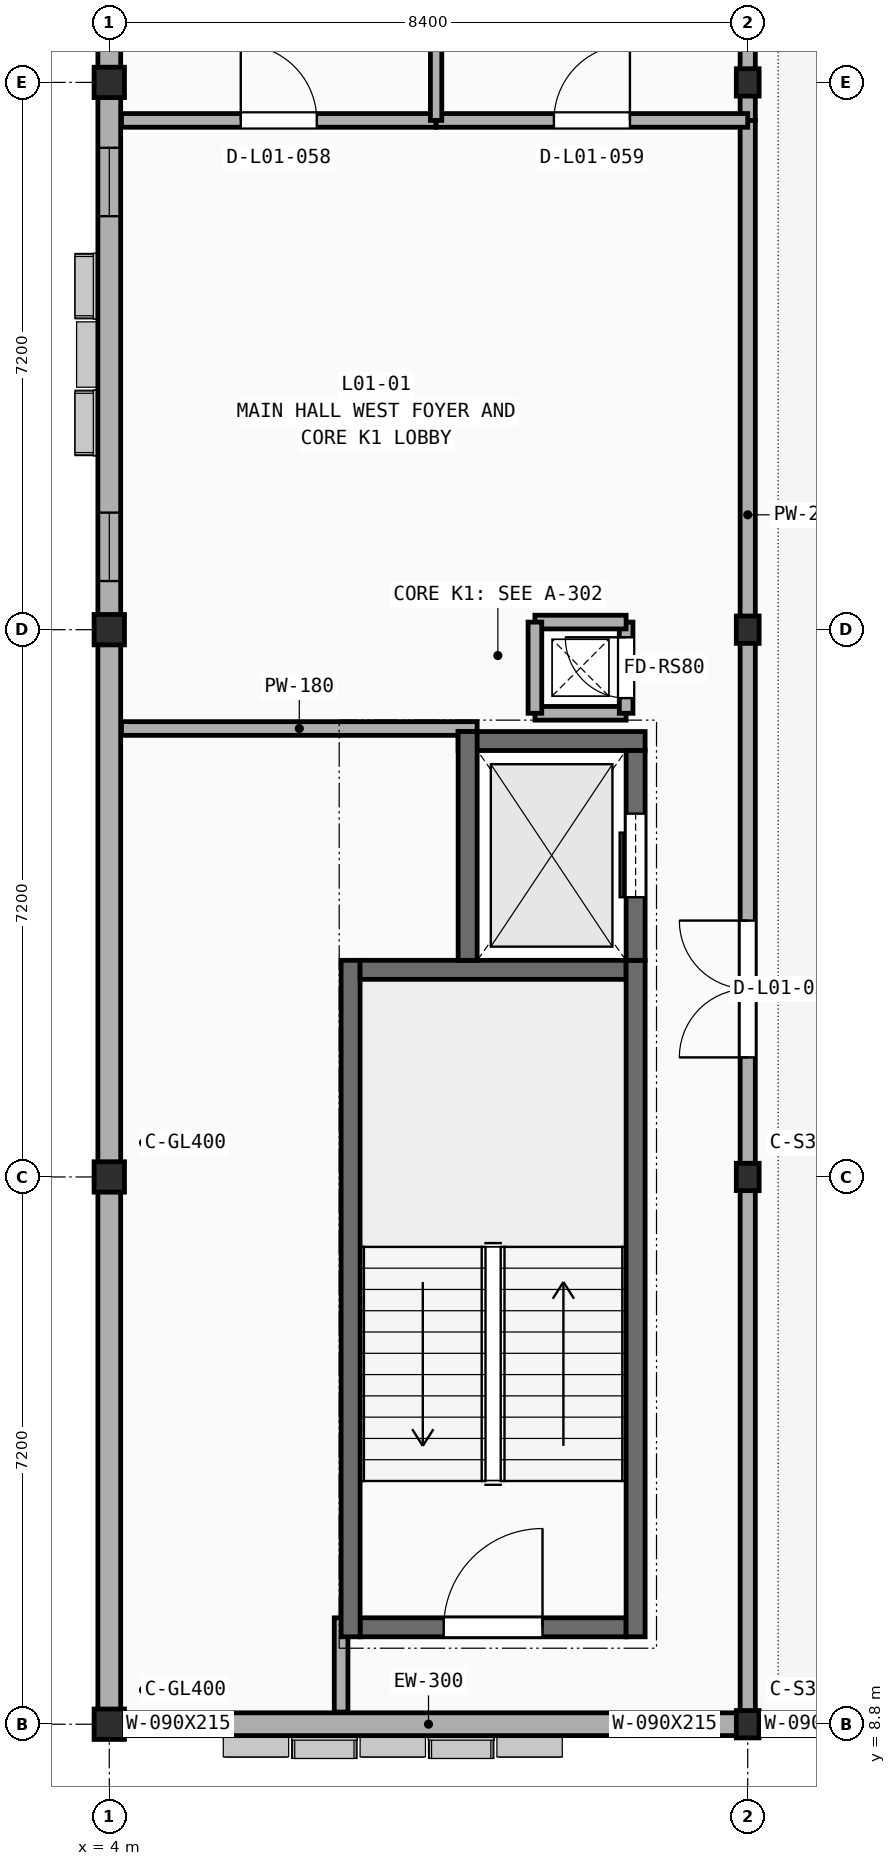
"""IFC4 building model, lengths in metres.
Left out: names, types, materials, properties, quantities, classifications, styles, units other than length and angle.
Written with IfcOpenShell. Run it as: python <this file> out.ifc"""

import sys

from ifc_helpers import new_model, si_unit, direction, frame, frame_2d, origin, origin_2d, place, context, subcontext, project, spatial, rectangle, i_section, extrude, element, fill, save


model = new_model("IFC4")
c1 = context("Model", 3, precision=1e-05, world=origin(), true_north=direction((0.0, 1.0)))
c2 = subcontext(c1, "Body", "Model", "MODEL_VIEW")
j1 = project(units=[si_unit("LENGTHUNIT", "METRE"), si_unit("PLANEANGLEUNIT", "RADIAN")], contexts=[c1])
p1 = place(None, origin())
s1 = spatial("IfcSite", under=j1, at=p1, CompositionType="ELEMENT")
p2 = place(p1, origin())
s2 = spatial("IfcBuilding", under=s1, at=p2, CompositionType="ELEMENT")
p3 = place(p2, frame((0.0, 0.0, 5.4)))
s3 = spatial("IfcBuildingStorey", under=s2, at=p3, CompositionType="ELEMENT", Elevation=5.4)
for number, where, z_axis, x_axis in (
    (1, (4.0, 8.8, 0.0), (0.0, 0.0, 1.0), (1.0, 0.0, 0.0)),
    (2, (4.0, 16.0, 0.0), (0.0, 0.0, 1.0), (1.0, 0.0, 0.0)),
    (3, (4.0, 23.2, 0.0), (0.0, 0.0, 1.0), (1.0, 0.0, 0.0)),
    (4, (4.0, 30.4, 0.0), (0.0, 0.0, 1.0), (1.0, 0.0, 0.0)),
):
    element("IfcColumn", number, at=place(p3, frame(where, z_axis=z_axis, x_axis=x_axis)), inside=s3, PredefinedType="COLUMN", context=c2, shape_type="SweptSolid", body=[
        extrude(rectangle(XDim=0.4, YDim=0.4, at=origin_2d()), origin(), (0.0, 0.0, 1.0), 4.2),
    ])
for number, where, z_axis, x_axis in (
    (5, (12.4, 8.8, 0.0), (0.0, 0.0, 1.0), (1.0, 0.0, 0.0)),
    (6, (12.4, 16.0, 0.0), (0.0, 0.0, 1.0), (1.0, 0.0, 0.0)),
    (7, (12.4, 23.2, 0.0), (0.0, 0.0, 1.0), (1.0, 0.0, 0.0)),
    (8, (12.4, 30.4, 0.0), (0.0, 0.0, 1.0), (1.0, 0.0, 0.0)),
):
    element("IfcColumn", number, at=place(p3, frame(where, z_axis=z_axis, x_axis=x_axis)), inside=s3, PredefinedType="COLUMN", context=c2, shape_type="SweptSolid", body=[
        extrude(i_section(OverallWidth=0.3, OverallDepth=0.36, WebThickness=0.012, FlangeThickness=0.022, at=origin_2d()), origin(), (0.0, 0.0, 1.0), 4.2),
    ])
p4 = place(p3, frame((7.05, 8.96, 0.0), z_axis=(0.0, 0.0, 1.0), x_axis=(0.0, 1.0, 0.0)))
e9 = element("IfcWall", 9, at=p4, inside=s3, PredefinedType="PARTITIONING", context=c2, shape_type="SweptSolid", body=[
    extrude(rectangle(XDim=1.24, YDim=0.18, at=frame_2d((0.62, 0.0))), origin(), (0.0, 0.0, 1.0), 3.5),
])
p5 = place(p3, frame((4.16, 21.9, 0.0), z_axis=(0.0, 0.0, 1.0), x_axis=(1.0, 0.0, 0.0)))
e10 = element("IfcWall", 10, at=p5, inside=s3, PredefinedType="PARTITIONING", context=c2, shape_type="SweptSolid", body=[
    extrude(rectangle(XDim=4.68, YDim=0.18, at=frame_2d((2.34, 0.0))), origin(), (0.0, 0.0, 1.0), 3.5),
])
p6 = place(p3, frame((12.4, 8.96, 0.0), z_axis=(0.0, 0.0, 1.0), x_axis=(0.0, 1.0, 0.0)))
e11 = element("IfcWall", 11, at=p6, inside=s3, PredefinedType="PARTITIONING", context=c2, shape_type="SweptSolid", body=[
    extrude(rectangle(XDim=20.94, YDim=0.2, at=frame_2d((10.47, 0.0))), origin(), (0.0, 0.0, 1.0), 3.35),
])
p7 = place(p6, frame((8.613, 0.0, -0.01)))
e12 = element("IfcOpeningElement", 12, at=p7, cuts=e11, PredefinedType="OPENING", context=c2, shape_type="SweptSolid", body=[
    extrude(rectangle(XDim=1.8, YDim=2.26, at=frame_2d((0.9, 1.13))), frame((0.0, 0.11, 0.0), z_axis=(0.0, -1.0, 0.0), x_axis=(1.0, 0.0, 0.0)), (0.0, 0.0, 1.0), 0.22),
])
p8 = place(p3, frame((12.4, 29.9, 0.0), z_axis=(0.0, 0.0, 1.0), x_axis=(0.0, 1.0, 0.0)))
e13 = element("IfcWall", 13, at=p8, inside=s3, PredefinedType="PARTITIONING", context=c2, shape_type="SweptSolid", body=[
    extrude(rectangle(XDim=7.56, YDim=0.2, at=frame_2d((3.78, 0.0))), origin(), (0.0, 0.0, 1.0), 3.23),
])
p9 = place(p3, frame((4.16, 29.9, 0.0), z_axis=(0.0, 0.0, 1.0), x_axis=(1.0, 0.0, 0.0)))
e14 = element("IfcWall", 14, at=p9, inside=s3, PredefinedType="PARTITIONING", context=c2, shape_type="SweptSolid", body=[
    extrude(rectangle(XDim=4.14, YDim=0.18, at=frame_2d((2.07, 0.0))), origin(), (0.0, 0.0, 1.0), 3.5),
])
p10 = place(p9, frame((1.57, 0.0, -0.01)))
e15 = element("IfcOpeningElement", 15, at=p10, cuts=e14, PredefinedType="OPENING", context=c2, shape_type="SweptSolid", body=[
    extrude(rectangle(XDim=1.0, YDim=2.16, at=frame_2d((0.5, 1.08))), frame((0.0, 0.1, 0.0), z_axis=(0.0, -1.0, 0.0), x_axis=(1.0, 0.0, 0.0)), (0.0, 0.0, 1.0), 0.2),
])
p11 = place(p3, frame((8.3, 29.9, 0.0), z_axis=(0.0, 0.0, 1.0), x_axis=(1.0, 0.0, 0.0)))
e16 = element("IfcWall", 16, at=p11, inside=s3, PredefinedType="PARTITIONING", context=c2, shape_type="SweptSolid", body=[
    extrude(rectangle(XDim=4.1, YDim=0.18, at=frame_2d((2.05, 0.0))), origin(), (0.0, 0.0, 1.0), 3.35),
])
p12 = place(p11, frame((1.55, 0.0, -0.01)))
e17 = element("IfcOpeningElement", 17, at=p12, cuts=e16, PredefinedType="OPENING", context=c2, shape_type="SweptSolid", body=[
    extrude(rectangle(XDim=1.0, YDim=2.16, at=frame_2d((0.5, 1.08))), frame((0.0, 0.1, 0.0), z_axis=(0.0, -1.0, 0.0), x_axis=(1.0, 0.0, 0.0)), (0.0, 0.0, 1.0), 0.2),
])
p13 = place(p3, frame((8.3, 29.9, 0.0), z_axis=(0.0, 0.0, 1.0), x_axis=(0.0, 1.0, 0.0)))
e18 = element("IfcWall", 18, at=p13, inside=s3, PredefinedType="PARTITIONING", context=c2, shape_type="SweptSolid", body=[
    extrude(rectangle(XDim=7.56, YDim=0.15, at=frame_2d((3.78, 0.0))), origin(), (0.0, 0.0, 1.0), 3.23),
])
p14 = place(p3, frame((4.0, 8.8, 0.0), z_axis=(0.0, 0.0, 1.0), x_axis=(1.0, 0.0, 0.0)))
e19 = element("IfcWall", 19, at=p14, inside=s3, PredefinedType="SOLIDWALL", context=c2, shape_type="SweptSolid", body=[
    extrude(rectangle(XDim=8.4, YDim=0.3, at=frame_2d((4.2, 0.0))), origin(), (0.0, 0.0, 1.0), 3.35),
])
p15 = place(p14, frame((0.46, 0.0, 0.85)))
e20 = element("IfcOpeningElement", 20, at=p15, cuts=e19, PredefinedType="OPENING", context=c2, shape_type="SweptSolid", body=[
    extrude(rectangle(XDim=0.9, YDim=2.15, at=frame_2d((0.45, 1.075))), frame((0.0, 0.16, 0.0), z_axis=(0.0, -1.0, 0.0), x_axis=(1.0, 0.0, 0.0)), (0.0, 0.0, 1.0), 0.32),
])
p16 = place(p14, frame((6.86, 0.0, 0.85)))
e21 = element("IfcOpeningElement", 21, at=p16, cuts=e19, PredefinedType="OPENING", context=c2, shape_type="SweptSolid", body=[
    extrude(rectangle(XDim=0.9, YDim=2.15, at=frame_2d((0.45, 1.075))), frame((0.0, 0.16, 0.0), z_axis=(0.0, -1.0, 0.0), x_axis=(1.0, 0.0, 0.0)), (0.0, 0.0, 1.0), 0.32),
])
p17 = place(p3, frame((12.4, 8.8, 0.0), z_axis=(0.0, 0.0, 1.0), x_axis=(1.0, 0.0, 0.0)))
e22 = element("IfcWall", 22, at=p17, inside=s3, PredefinedType="SOLIDWALL", context=c2, shape_type="SweptSolid", body=[
    extrude(rectangle(XDim=8.4, YDim=0.3, at=frame_2d((4.2, 0.0))), origin(), (0.0, 0.0, 1.0), 3.35),
])
p18 = place(p17, frame((0.46, 0.0, 0.85)))
e23 = element("IfcOpeningElement", 23, at=p18, cuts=e22, PredefinedType="OPENING", context=c2, shape_type="SweptSolid", body=[
    extrude(rectangle(XDim=0.9, YDim=2.15, at=frame_2d((0.45, 1.075))), frame((0.0, 0.16, 0.0), z_axis=(0.0, -1.0, 0.0), x_axis=(1.0, 0.0, 0.0)), (0.0, 0.0, 1.0), 0.32),
])
p19 = place(p17, frame((6.86, 0.0, 0.85)))
e24 = element("IfcOpeningElement", 24, at=p19, cuts=e22, PredefinedType="OPENING", context=c2, shape_type="SweptSolid", body=[
    extrude(rectangle(XDim=0.9, YDim=2.15, at=frame_2d((0.45, 1.075))), frame((0.0, 0.16, 0.0), z_axis=(0.0, -1.0, 0.0), x_axis=(1.0, 0.0, 0.0)), (0.0, 0.0, 1.0), 0.32),
])
for number, where, z_axis, x_axis in (
    (25, (4.0, 16.0, 0.0), (0.0, 0.0, 1.0), (0.0, -1.0, 0.0)),
    (26, (4.0, 23.2, 0.0), (0.0, 0.0, 1.0), (0.0, -1.0, 0.0)),
):
    element("IfcWall", number, at=place(p3, frame(where, z_axis=z_axis, x_axis=x_axis)), inside=s3, PredefinedType="SOLIDWALL", context=c2, shape_type="SweptSolid", body=[
        extrude(rectangle(XDim=7.2, YDim=0.3, at=frame_2d((3.6, 0.0))), origin(), (0.0, 0.0, 1.0), 3.5),
    ])
p20 = place(p3, frame((4.0, 30.4, 0.0), z_axis=(0.0, 0.0, 1.0), x_axis=(0.0, -1.0, 0.0)))
e27 = element("IfcWall", 27, at=p20, inside=s3, PredefinedType="SOLIDWALL", context=c2, shape_type="SweptSolid", body=[
    extrude(rectangle(XDim=7.2, YDim=0.3, at=frame_2d((3.6, 0.0))), origin(), (0.0, 0.0, 1.0), 3.23),
])
p21 = place(p20, frame((0.86, 0.0, 0.85)))
e28 = element("IfcOpeningElement", 28, at=p21, cuts=e27, PredefinedType="OPENING", context=c2, shape_type="SweptSolid", body=[
    extrude(rectangle(XDim=0.9, YDim=2.15, at=frame_2d((0.45, 1.075))), frame((0.0, 0.16, 0.0), z_axis=(0.0, -1.0, 0.0), x_axis=(1.0, 0.0, 0.0)), (0.0, 0.0, 1.0), 0.32),
])
p22 = place(p20, frame((5.66, 0.0, 0.85)))
e29 = element("IfcOpeningElement", 29, at=p22, cuts=e27, PredefinedType="OPENING", context=c2, shape_type="SweptSolid", body=[
    extrude(rectangle(XDim=0.9, YDim=2.15, at=frame_2d((0.45, 1.075))), frame((0.0, 0.16, 0.0), z_axis=(0.0, -1.0, 0.0), x_axis=(1.0, 0.0, 0.0)), (0.0, 0.0, 1.0), 0.32),
])
p23 = place(p3, frame((4.0, 37.6, 0.0), z_axis=(0.0, 0.0, 1.0), x_axis=(0.0, -1.0, 0.0)))
e30 = element("IfcWall", 30, at=p23, inside=s3, PredefinedType="SOLIDWALL", context=c2, shape_type="SweptSolid", body=[
    extrude(rectangle(XDim=7.2, YDim=0.3, at=frame_2d((3.6, 0.0))), origin(), (0.0, 0.0, 1.0), 3.23),
])
p24 = place(p23, frame((0.46, 0.0, 0.85)))
e31 = element("IfcOpeningElement", 31, at=p24, cuts=e30, PredefinedType="OPENING", context=c2, shape_type="SweptSolid", body=[
    extrude(rectangle(XDim=0.9, YDim=2.15, at=frame_2d((0.45, 1.075))), frame((0.0, 0.16, 0.0), z_axis=(0.0, -1.0, 0.0), x_axis=(1.0, 0.0, 0.0)), (0.0, 0.0, 1.0), 0.32),
])
p25 = place(p23, frame((5.66, 0.0, 0.85)))
e32 = element("IfcOpeningElement", 32, at=p25, cuts=e30, PredefinedType="OPENING", context=c2, shape_type="SweptSolid", body=[
    extrude(rectangle(XDim=0.9, YDim=2.15, at=frame_2d((0.45, 1.075))), frame((0.0, 0.16, 0.0), z_axis=(0.0, -1.0, 0.0), x_axis=(1.0, 0.0, 0.0)), (0.0, 0.0, 1.0), 0.32),
])
p26 = place(p3, frame((7.3, 10.075, 0.0), z_axis=(0.0, 0.0, 1.0), x_axis=(1.0, 0.0, 0.0)))
e33 = element("IfcWall", 33, at=p26, inside=s3, PredefinedType="SHEAR", context=c2, shape_type="SweptSolid", body=[
    extrude(rectangle(XDim=3.5, YDim=0.25, at=frame_2d((1.75, 0.0))), origin(), (0.0, 0.0, 1.0), 4.2),
])
p27 = place(p26, frame((1.1, 0.0, -0.01)))
e34 = element("IfcOpeningElement", 34, at=p27, cuts=e33, PredefinedType="OPENING", context=c2, shape_type="SweptSolid", body=[
    extrude(rectangle(XDim=1.3, YDim=2.16, at=frame_2d((0.65, 1.08))), frame((0.0, 0.135, 0.0), z_axis=(0.0, -1.0, 0.0), x_axis=(1.0, 0.0, 0.0)), (0.0, 0.0, 1.0), 0.27),
])
p28 = place(p3, frame((7.175, 9.95, 0.0), z_axis=(0.0, 0.0, 1.0), x_axis=(0.0, 1.0, 0.0)))
e35 = element("IfcWall", 35, at=p28, inside=s3, PredefinedType="SHEAR", context=c2, shape_type="SweptSolid", body=[
    extrude(rectangle(XDim=8.9, YDim=0.25, at=frame_2d((4.45, 0.0))), origin(), (0.0, 0.0, 1.0), 4.2),
])
p29 = place(p3, frame((10.8, 18.725, 0.0), z_axis=(0.0, 0.0, 1.0), x_axis=(-1.0, 0.0, 0.0)))
e36 = element("IfcWall", 36, at=p29, inside=s3, PredefinedType="SHEAR", context=c2, shape_type="SweptSolid", body=[
    extrude(rectangle(XDim=3.5, YDim=0.25, at=frame_2d((1.75, 0.0))), origin(), (0.0, 0.0, 1.0), 4.2),
])
p30 = place(p3, frame((10.925, 9.95, 0.0), z_axis=(0.0, 0.0, 1.0), x_axis=(0.0, 1.0, 0.0)))
e37 = element("IfcWall", 37, at=p30, inside=s3, PredefinedType="SHEAR", context=c2, shape_type="SweptSolid", body=[
    extrude(rectangle(XDim=8.9, YDim=0.25, at=frame_2d((4.45, 0.0))), origin(), (0.0, 0.0, 1.0), 4.2),
])
p31 = place(p3, frame((8.59, 21.735, 0.0), z_axis=(0.0, 0.0, 1.0), x_axis=(1.0, 0.0, 0.0)))
e38 = element("IfcWall", 38, at=p31, inside=s3, PredefinedType="SHEAR", context=c2, shape_type="SweptSolid", body=[
    extrude(rectangle(XDim=2.46, YDim=0.25, at=frame_2d((1.23, 0.0))), origin(), (0.0, 0.0, 1.0), 4.2),
])
p32 = place(p3, frame((10.925, 18.85, 0.0), z_axis=(0.0, 0.0, 1.0), x_axis=(0.0, 1.0, 0.0)))
e39 = element("IfcWall", 39, at=p32, inside=s3, PredefinedType="SHEAR", context=c2, shape_type="SweptSolid", body=[
    extrude(rectangle(XDim=2.76, YDim=0.25, at=frame_2d((1.38, 0.0))), origin(), (0.0, 0.0, 1.0), 4.2),
])
p33 = place(p32, frame((0.83, 0.0, -0.01)))
e40 = element("IfcOpeningElement", 40, at=p33, cuts=e39, PredefinedType="OPENING", context=c2, shape_type="SweptSolid", body=[
    extrude(rectangle(XDim=1.1, YDim=2.16, at=frame_2d((0.55, 1.08))), frame((0.0, 0.135, 0.0), z_axis=(0.0, -1.0, 0.0), x_axis=(1.0, 0.0, 0.0)), (0.0, 0.0, 1.0), 0.27),
])
p34 = place(p3, frame((8.715, 18.85, 0.0), z_axis=(0.0, 0.0, 1.0), x_axis=(0.0, 1.0, 0.0)))
e41 = element("IfcWall", 41, at=p34, inside=s3, PredefinedType="SHEAR", context=c2, shape_type="SweptSolid", body=[
    extrude(rectangle(XDim=3.01, YDim=0.25, at=frame_2d((1.505, 0.0))), origin(), (0.0, 0.0, 1.0), 4.2),
])
p35 = place(p3, frame((9.6, 22.1, 0.0), z_axis=(0.0, 0.0, 1.0), x_axis=(1.0, 0.0, 0.0)))
e42 = element("IfcWall", 42, at=p35, inside=s3, PredefinedType="SOLIDWALL", context=c2, shape_type="SweptSolid", body=[
    extrude(rectangle(XDim=1.2, YDim=0.18, at=frame_2d((0.6, 0.0))), origin(), (0.0, 0.0, 1.0), 3.97),
])
p36 = place(p3, frame((10.8, 22.1, 0.0), z_axis=(0.0, 0.0, 1.0), x_axis=(0.0, 1.0, 0.0)))
e43 = element("IfcWall", 43, at=p36, inside=s3, PredefinedType="SOLIDWALL", context=c2, shape_type="SweptSolid", body=[
    extrude(rectangle(XDim=1.2, YDim=0.18, at=frame_2d((0.6, 0.0))), origin(), (0.0, 0.0, 1.0), 3.97),
])
p37 = place(p36, frame((0.2, 0.0, -0.01)))
e44 = element("IfcOpeningElement", 44, at=p37, cuts=e43, PredefinedType="OPENING", context=c2, shape_type="SweptSolid", body=[
    extrude(rectangle(XDim=0.8, YDim=2.06, at=frame_2d((0.4, 1.03))), frame((0.0, 0.1, 0.0), z_axis=(0.0, -1.0, 0.0), x_axis=(1.0, 0.0, 0.0)), (0.0, 0.0, 1.0), 0.2),
])
for number, where, z_axis, x_axis in (
    (45, (10.8, 23.3, 0.0), (0.0, 0.0, 1.0), (-1.0, 0.0, 0.0)),
    (46, (9.6, 23.3, 0.0), (0.0, 0.0, 1.0), (0.0, -1.0, 0.0)),
):
    element("IfcWall", number, at=place(p3, frame(where, z_axis=z_axis, x_axis=x_axis)), inside=s3, PredefinedType="SOLIDWALL", context=c2, shape_type="SweptSolid", body=[
        extrude(rectangle(XDim=1.2, YDim=0.18, at=frame_2d((0.6, 0.0))), origin(), (0.0, 0.0, 1.0), 3.97),
    ])
p38 = place(p7, frame((1.8, 0.0, 0.01), z_axis=(0.0, 0.0, 1.0), x_axis=(-1.0, 0.0, 0.0)))
e47 = element("IfcDoor", 47, at=p38, inside=s3, OperationType="DOUBLE_SWING_LEFT", PredefinedType="DOOR", context=c2, shape_type="SweptSolid", body=[
    extrude(rectangle(XDim=1.8, YDim=2.25, at=frame_2d((0.9, 1.125))), frame((0.0, 0.025, 0.0), z_axis=(0.0, -1.0, 0.0), x_axis=(1.0, 0.0, 0.0)), (0.0, 0.0, 1.0), 0.05),
])
fill(e12, e47)
p39 = place(p10, frame((0.0, 0.0, 0.01)))
e48 = element("IfcDoor", 48, at=p39, inside=s3, OperationType="SINGLE_SWING_LEFT", PredefinedType="DOOR", context=c2, shape_type="SweptSolid", body=[
    extrude(rectangle(XDim=1.0, YDim=2.15, at=frame_2d((0.5, 1.075))), frame((0.0, 0.025, 0.0), z_axis=(0.0, -1.0, 0.0), x_axis=(1.0, 0.0, 0.0)), (0.0, 0.0, 1.0), 0.05),
])
fill(e15, e48)
p40 = place(p12, frame((0.0, 0.0, 0.01)))
e49 = element("IfcDoor", 49, at=p40, inside=s3, OperationType="SINGLE_SWING_RIGHT", PredefinedType="DOOR", context=c2, shape_type="SweptSolid", body=[
    extrude(rectangle(XDim=1.0, YDim=2.15, at=frame_2d((0.5, 1.075))), frame((0.0, 0.025, 0.0), z_axis=(0.0, -1.0, 0.0), x_axis=(1.0, 0.0, 0.0)), (0.0, 0.0, 1.0), 0.05),
])
fill(e17, e49)
p41 = place(p15, origin())
e50 = element("IfcWindow", 50, at=p41, inside=s3, PartitioningType="SINGLE_PANEL", PredefinedType="WINDOW", context=c2, shape_type="SweptSolid", body=[
    extrude(rectangle(XDim=0.9, YDim=2.15, at=frame_2d((0.45, 1.075))), frame((0.0, 0.03, 0.0), z_axis=(0.0, -1.0, 0.0), x_axis=(1.0, 0.0, 0.0)), (0.0, 0.0, 1.0), 0.06),
])
fill(e20, e50)
p42 = place(p16, origin())
e51 = element("IfcWindow", 51, at=p42, inside=s3, PartitioningType="SINGLE_PANEL", PredefinedType="WINDOW", context=c2, shape_type="SweptSolid", body=[
    extrude(rectangle(XDim=0.9, YDim=2.15, at=frame_2d((0.45, 1.075))), frame((0.0, 0.03, 0.0), z_axis=(0.0, -1.0, 0.0), x_axis=(1.0, 0.0, 0.0)), (0.0, 0.0, 1.0), 0.06),
])
fill(e21, e51)
p43 = place(p18, origin())
e52 = element("IfcWindow", 52, at=p43, inside=s3, PartitioningType="SINGLE_PANEL", PredefinedType="WINDOW", context=c2, shape_type="SweptSolid", body=[
    extrude(rectangle(XDim=0.9, YDim=2.15, at=frame_2d((0.45, 1.075))), frame((0.0, 0.03, 0.0), z_axis=(0.0, -1.0, 0.0), x_axis=(1.0, 0.0, 0.0)), (0.0, 0.0, 1.0), 0.06),
])
fill(e23, e52)
p44 = place(p21, origin())
e53 = element("IfcWindow", 53, at=p44, inside=s3, PartitioningType="SINGLE_PANEL", PredefinedType="WINDOW", context=c2, shape_type="SweptSolid", body=[
    extrude(rectangle(XDim=0.9, YDim=2.15, at=frame_2d((0.45, 1.075))), frame((0.0, 0.03, 0.0), z_axis=(0.0, -1.0, 0.0), x_axis=(1.0, 0.0, 0.0)), (0.0, 0.0, 1.0), 0.06),
])
fill(e28, e53)
p45 = place(p22, origin())
e54 = element("IfcWindow", 54, at=p45, inside=s3, PartitioningType="SINGLE_PANEL", PredefinedType="WINDOW", context=c2, shape_type="SweptSolid", body=[
    extrude(rectangle(XDim=0.9, YDim=2.15, at=frame_2d((0.45, 1.075))), frame((0.0, 0.03, 0.0), z_axis=(0.0, -1.0, 0.0), x_axis=(1.0, 0.0, 0.0)), (0.0, 0.0, 1.0), 0.06),
])
fill(e29, e54)
p46 = place(p27, frame((0.0, 0.0, 0.01)))
e55 = element("IfcDoor", 55, at=p46, inside=s3, OperationType="SINGLE_SWING_RIGHT", PredefinedType="DOOR", context=c2, shape_type="SweptSolid", body=[
    extrude(rectangle(XDim=1.3, YDim=2.15, at=frame_2d((0.65, 1.075))), frame((0.0, 0.025, 0.0), z_axis=(0.0, -1.0, 0.0), x_axis=(1.0, 0.0, 0.0)), (0.0, 0.0, 1.0), 0.05),
])
fill(e34, e55)
p47 = place(p33, frame((0.0, 0.0, 0.01)))
e56 = element("IfcDoor", 56, at=p47, inside=s3, OperationType="SLIDING_TO_LEFT", PredefinedType="DOOR", context=c2, shape_type="SweptSolid", body=[
    extrude(rectangle(XDim=1.1, YDim=2.15, at=frame_2d((0.55, 1.075))), frame((0.0, 0.025, 0.0), z_axis=(0.0, -1.0, 0.0), x_axis=(1.0, 0.0, 0.0)), (0.0, 0.0, 1.0), 0.05),
])
fill(e40, e56)
p48 = place(p37, frame((0.0, 0.0, 0.01)))
e57 = element("IfcDoor", 57, at=p48, inside=s3, OperationType="SINGLE_SWING_RIGHT", PredefinedType="DOOR", context=c2, shape_type="SweptSolid", body=[
    extrude(rectangle(XDim=0.8, YDim=2.05, at=frame_2d((0.4, 1.025))), frame((0.0, 0.025, 0.0), z_axis=(0.0, -1.0, 0.0), x_axis=(1.0, 0.0, 0.0)), (0.0, 0.0, 1.0), 0.05),
])
fill(e44, e57)
save(model, sys.argv[1])
